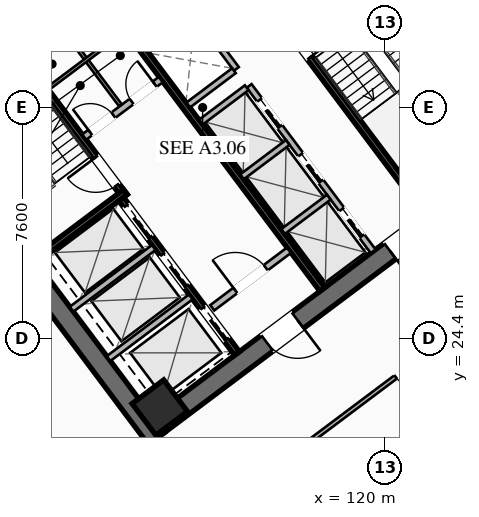
"""IFC4 building model, lengths in metres.
Left out: names, types, materials, properties, quantities, classifications, styles, units other than length and angle.
Written with IfcOpenShell. Run it as: python <this file> out.ifc"""

import sys

from ifc_helpers import new_model, si_unit, direction, frame, frame_2d, origin, origin_2d, place, context, subcontext, project, spatial, rectangle, hollow_rectangle, extrude, element, fill, save


model = new_model("IFC4")
c1 = context("Model", 3, precision=1e-05, world=origin(), true_north=direction((0.0, 1.0)))
c2 = subcontext(c1, "Body", "Model", "MODEL_VIEW")
j1 = project(units=[si_unit("LENGTHUNIT", "METRE"), si_unit("PLANEANGLEUNIT", "RADIAN")], contexts=[c1])
p1 = place(None, origin())
s1 = spatial("IfcSite", under=j1, at=p1, CompositionType="ELEMENT")
p2 = place(p1, origin())
s2 = spatial("IfcBuilding", under=s1, at=p2, CompositionType="ELEMENT")
p3 = place(p2, frame((0.0, 0.0, 60.1)))
s3 = spatial("IfcBuildingStorey", under=s2, at=p3, CompositionType="ELEMENT", Elevation=60.1)
for number, where, z_axis, x_axis in (
    (1, (112.476, 21.107, 0.0), (0.0, 0.0, 1.0), (-0.6, 0.8, 0.0)),
    (2, (115.524, 42.893, 0.0), (0.0, 0.0, 1.0), (0.6, -0.8, 0.0)),
):
    element("IfcWall", number, at=place(p3, frame(where, z_axis=z_axis, x_axis=x_axis)), inside=s3, PredefinedType="SHEAR", context=c2, shape_type="SweptSolid", body=[
        extrude(rectangle(XDim=15.6, YDim=0.65, at=frame_2d((7.8, 0.0))), origin(), (0.0, 0.0, 1.0), 3.55),
    ])
p4 = place(p3, frame((124.429, 30.478, 0.0), z_axis=(0.0, 0.0, 1.0), x_axis=(-0.799998028465, -0.600002628705, 0.0)))
e3 = element("IfcWall", 3, at=p4, inside=s3, PredefinedType="SHEAR", context=c2, shape_type="SweptSolid", body=[
    extrude(rectangle(XDim=14.86, YDim=0.65, at=frame_2d((7.43, 0.0))), origin(), (0.0, 0.0, 1.0), 3.55),
])
p5 = place(p4, frame((9.13, 0.0, 0.0)))
e4 = element("IfcOpeningElement", 4, at=p5, cuts=e3, PredefinedType="OPENING", context=c2, shape_type="SweptSolid", body=[
    extrude(rectangle(XDim=1.25, YDim=2.25, at=frame_2d((0.625, 1.125))), frame((0.0, 0.335, 0.0), z_axis=(0.0, -1.0, 0.0), x_axis=(1.0, 0.0, 0.0)), (0.0, 0.0, 1.0), 0.67),
])
p6 = place(p4, frame((4.08, 0.0, 0.0)))
e5 = element("IfcOpeningElement", 5, at=p6, cuts=e3, PredefinedType="OPENING", context=c2, shape_type="SweptSolid", body=[
    extrude(rectangle(XDim=1.25, YDim=2.25, at=frame_2d((0.625, 1.125))), frame((0.0, 0.335, 0.0), z_axis=(0.0, -1.0, 0.0), x_axis=(1.0, 0.0, 0.0)), (0.0, 0.0, 1.0), 0.67),
])
p7 = place(p3, frame((103.571, 33.522, 0.0), z_axis=(0.0, 0.0, 1.0), x_axis=(0.799998028465, 0.600002628705, 0.0)))
e6 = element("IfcWall", 6, at=p7, inside=s3, PredefinedType="SHEAR", context=c2, shape_type="SweptSolid", body=[
    extrude(rectangle(XDim=14.86, YDim=0.65, at=frame_2d((7.43, 0.0))), origin(), (0.0, 0.0, 1.0), 3.55),
])
p8 = place(p7, frame((4.48, 0.0, 0.0)))
e7 = element("IfcOpeningElement", 7, at=p8, cuts=e6, PredefinedType="OPENING", context=c2, shape_type="SweptSolid", body=[
    extrude(rectangle(XDim=1.25, YDim=2.25, at=frame_2d((0.625, 1.125))), frame((0.0, 0.335, 0.0), z_axis=(0.0, -1.0, 0.0), x_axis=(1.0, 0.0, 0.0)), (0.0, 0.0, 1.0), 0.67),
])
p9 = place(p7, frame((9.53, 0.0, 0.0)))
e8 = element("IfcOpeningElement", 8, at=p9, cuts=e6, PredefinedType="OPENING", context=c2, shape_type="SweptSolid", body=[
    extrude(rectangle(XDim=1.25, YDim=2.25, at=frame_2d((0.625, 1.125))), frame((0.0, 0.335, 0.0), z_axis=(0.0, -1.0, 0.0), x_axis=(1.0, 0.0, 0.0)), (0.0, 0.0, 1.0), 0.67),
])
p10 = place(p3, frame((112.59, 22.13, 0.0), z_axis=(0.0, 0.0, 1.0), x_axis=(0.799999996291, 0.600000004945, 0.0)))
e9 = element("IfcColumn", 9, at=p10, inside=s3, PredefinedType="COLUMN", context=c2, shape_type="SweptSolid", body=[
    extrude(hollow_rectangle(XDim=1.3, YDim=1.3, WallThickness=0.05, at=origin_2d()), origin(), (0.0, 0.0, 1.0), 3.35),
])
p11 = place(p3, frame((111.44, 29.08, 0.0), z_axis=(0.0, 0.0, 1.0), x_axis=(-0.600009827119, 0.799992629566, 0.0)))
e10 = element("IfcWall", 10, at=p11, inside=s3, PredefinedType="SHEAR", context=c2, shape_type="SweptSolid", body=[
    extrude(rectangle(XDim=7.95, YDim=0.2, at=frame_2d((3.975, 0.0))), origin(), (0.0, 0.0, 1.0), 3.35),
])
p12 = place(p11, frame((0.45, 0.0, 0.0)))
e11 = element("IfcOpeningElement", 11, at=p12, cuts=e10, PredefinedType="OPENING", context=c2, shape_type="SweptSolid", body=[
    extrude(rectangle(XDim=1.15, YDim=2.2, at=frame_2d((0.575, 1.1))), frame((0.0, 0.11, 0.0), z_axis=(0.0, -1.0, 0.0), x_axis=(1.0, 0.0, 0.0)), (0.0, 0.0, 1.0), 0.22),
])
p13 = place(p3, frame((108.476, 26.982, 0.0), z_axis=(0.0, 0.0, 1.0), x_axis=(0.799984290658, 0.600020945218, 0.0)))
e12 = element("IfcWall", 12, at=p13, inside=s3, PredefinedType="SHEAR", context=c2, shape_type="SweptSolid", body=[
    extrude(rectangle(XDim=3.73, YDim=0.2, at=frame_2d((1.865, 0.0))), origin(), (0.0, 0.0, 1.0), 3.35),
])
p14 = place(p3, frame((116.56, 34.92, 0.0), z_axis=(0.0, 0.0, 1.0), x_axis=(0.600009827119, -0.799992629566, 0.0)))
e13 = element("IfcWall", 13, at=p14, inside=s3, PredefinedType="SHEAR", context=c2, shape_type="SweptSolid", body=[
    extrude(rectangle(XDim=7.95, YDim=0.2, at=frame_2d((3.975, 0.0))), origin(), (0.0, 0.0, 1.0), 3.35),
])
p15 = place(p14, frame((0.45, 0.0, 0.0)))
e14 = element("IfcOpeningElement", 14, at=p15, cuts=e13, PredefinedType="OPENING", context=c2, shape_type="SweptSolid", body=[
    extrude(rectangle(XDim=1.15, YDim=2.2, at=frame_2d((0.575, 1.1))), frame((0.0, 0.11, 0.0), z_axis=(0.0, -1.0, 0.0), x_axis=(1.0, 0.0, 0.0)), (0.0, 0.0, 1.0), 0.22),
])
p16 = place(p3, frame((117.938, 26.016, 0.0), z_axis=(0.0, 0.0, 1.0), x_axis=(-0.600005463273, 0.799995902516, 0.0)))
e15 = element("IfcWall", 15, at=p16, inside=s3, PredefinedType="SHEAR", context=c2, shape_type="SweptSolid", body=[
    extrude(rectangle(XDim=14.3, YDim=0.2, at=frame_2d((7.15, 0.0))), origin(), (0.0, 0.0, 1.0), 3.35),
])
p17 = place(p3, frame((110.104, 31.028, 0.0), z_axis=(0.0, 0.0, 1.0), x_axis=(0.800018601094, 0.59997519774, 0.0)))
e16 = element("IfcWall", 16, at=p17, inside=s3, PredefinedType="SOLIDWALL", context=c2, shape_type="SweptSolid", body=[
    extrude(rectangle(XDim=3.15, YDim=0.22, at=frame_2d((1.575, 0.0))), origin(), (0.0, 0.0, 1.0), 2.703),
])
p18 = place(p17, frame((0.25, 0.0, 0.0)))
e17 = element("IfcOpeningElement", 17, at=p18, cuts=e16, PredefinedType="OPENING", context=c2, shape_type="SweptSolid", body=[
    extrude(rectangle(XDim=0.95, YDim=2.05, at=frame_2d((0.475, 1.025))), frame((0.0, 0.12, 0.0), z_axis=(0.0, -1.0, 0.0), x_axis=(1.0, 0.0, 0.0)), (0.0, 0.0, 1.0), 0.24),
])
p19 = place(p17, frame((1.95, 0.0, 0.0)))
e18 = element("IfcOpeningElement", 18, at=p19, cuts=e16, PredefinedType="OPENING", context=c2, shape_type="SweptSolid", body=[
    extrude(rectangle(XDim=0.95, YDim=2.05, at=frame_2d((0.475, 1.025))), frame((0.0, 0.12, 0.0), z_axis=(0.0, -1.0, 0.0), x_axis=(1.0, 0.0, 0.0)), (0.0, 0.0, 1.0), 0.24),
])
p20 = place(p3, frame((114.316, 25.412, 0.0), z_axis=(0.0, 0.0, 1.0), x_axis=(0.800018601094, 0.59997519774, 0.0)))
e19 = element("IfcWall", 19, at=p20, inside=s3, PredefinedType="SOLIDWALL", context=c2, shape_type="SweptSolid", body=[
    extrude(rectangle(XDim=3.15, YDim=0.22, at=frame_2d((1.575, 0.0))), origin(), (0.0, 0.0, 1.0), 2.703),
])
p21 = place(p20, frame((0.95, 0.0, 0.0)))
e20 = element("IfcOpeningElement", 20, at=p21, cuts=e19, PredefinedType="OPENING", context=c2, shape_type="SweptSolid", body=[
    extrude(rectangle(XDim=1.25, YDim=2.25, at=frame_2d((0.625, 1.125))), frame((0.0, 0.12, 0.0), z_axis=(0.0, -1.0, 0.0), x_axis=(1.0, 0.0, 0.0)), (0.0, 0.0, 1.0), 0.24),
])
p22 = place(p3, frame((115.13, 23.91, 0.0), z_axis=(0.0, 0.0, 1.0), x_axis=(-0.599975393228, 0.800018454488, 0.0)))
e21 = element("IfcWall", 21, at=p22, inside=s3, PredefinedType="SHEAR", context=c2, shape_type="SweptSolid", body=[
    extrude(rectangle(XDim=6.35, YDim=0.2, at=frame_2d((3.175, 0.0))), origin(), (0.0, 0.0, 1.0), 3.35),
])
p23 = place(p22, frame((4.775, 0.0, 0.0)))
e22 = element("IfcOpeningElement", 22, at=p23, cuts=e21, PredefinedType="OPENING", context=c2, shape_type="SweptSolid", body=[
    extrude(rectangle(XDim=1.3, YDim=2.25, at=frame_2d((0.65, 1.125))), frame((0.0, 0.11, 0.0), z_axis=(0.0, -1.0, 0.0), x_axis=(1.0, 0.0, 0.0)), (0.0, 0.0, 1.0), 0.22),
])
p24 = place(p22, frame((2.775, 0.0, 0.0)))
e23 = element("IfcOpeningElement", 23, at=p24, cuts=e21, PredefinedType="OPENING", context=c2, shape_type="SweptSolid", body=[
    extrude(rectangle(XDim=1.3, YDim=2.25, at=frame_2d((0.65, 1.125))), frame((0.0, 0.11, 0.0), z_axis=(0.0, -1.0, 0.0), x_axis=(1.0, 0.0, 0.0)), (0.0, 0.0, 1.0), 0.22),
])
p25 = place(p22, frame((0.575, 0.0, 0.0)))
e24 = element("IfcOpeningElement", 24, at=p25, cuts=e21, PredefinedType="OPENING", context=c2, shape_type="SweptSolid", body=[
    extrude(rectangle(XDim=1.3, YDim=2.25, at=frame_2d((0.65, 1.125))), frame((0.0, 0.11, 0.0), z_axis=(0.0, -1.0, 0.0), x_axis=(1.0, 0.0, 0.0)), (0.0, 0.0, 1.0), 0.22),
])
for number, where, z_axis, x_axis in (
    (25, (110.906, 23.742, 0.0), (0.0, 0.0, 1.0), (0.8, 0.6, 0.0)),
    (26, (109.688, 25.366, 0.0), (0.0, 0.0, 1.0), (0.8, 0.6, 0.0)),
):
    element("IfcWall", number, at=place(p3, frame(where, z_axis=z_axis, x_axis=x_axis)), inside=s3, PredefinedType="SOLIDWALL", context=c2, shape_type="SweptSolid", body=[
        extrude(rectangle(XDim=3.38, YDim=0.2, at=frame_2d((1.69, 0.0))), origin(), (0.0, 0.0, 1.0), 3.35),
    ])
p26 = place(p3, frame((111.296, 32.072, 0.0), z_axis=(0.0, 0.0, 1.0), x_axis=(-0.59995887973, 0.800030838552, 0.0)))
e27 = element("IfcWall", 27, at=p26, inside=s3, PredefinedType="PARTITIONING", context=c2, shape_type="SweptSolid", body=[
    extrude(rectangle(XDim=3.8, YDim=0.11, at=frame_2d((1.9, 0.0))), origin(), (0.0, 0.0, 1.0), 2.703),
])
p27 = place(p3, frame((108.91, 32.62, 0.0), z_axis=(0.0, 0.0, 1.0), x_axis=(0.800018601094, 0.59997519774, 0.0)))
e28 = element("IfcWall", 28, at=p27, inside=s3, PredefinedType="PARTITIONING", context=c2, shape_type="SweptSolid", body=[
    extrude(rectangle(XDim=3.15, YDim=0.11, at=frame_2d((1.575, 0.0))), origin(), (0.0, 0.0, 1.0), 2.703),
])
p28 = place(p3, frame((119.61, 27.27, 0.0), z_axis=(0.0, 0.0, 1.0), x_axis=(-0.600011488909, 0.79999138319, 0.0)))
e29 = element("IfcWall", 29, at=p28, inside=s3, PredefinedType="SOLIDWALL", context=c2, shape_type="SweptSolid", body=[
    extrude(rectangle(XDim=6.8, YDim=0.2, at=frame_2d((3.4, 0.0))), origin(), (0.0, 0.0, 1.0), 3.35),
])
p29 = place(p28, frame((0.625, 0.0, 0.0)))
e30 = element("IfcOpeningElement", 30, at=p29, cuts=e29, PredefinedType="OPENING", context=c2, shape_type="SweptSolid", body=[
    extrude(rectangle(XDim=1.1, YDim=2.2, at=frame_2d((0.55, 1.1))), frame((0.0, 0.11, 0.0), z_axis=(0.0, -1.0, 0.0), x_axis=(1.0, 0.0, 0.0)), (0.0, 0.0, 1.0), 0.22),
])
p30 = place(p28, frame((2.875, 0.0, 0.0)))
e31 = element("IfcOpeningElement", 31, at=p30, cuts=e29, PredefinedType="OPENING", context=c2, shape_type="SweptSolid", body=[
    extrude(rectangle(XDim=1.1, YDim=2.2, at=frame_2d((0.55, 1.1))), frame((0.0, 0.11, 0.0), z_axis=(0.0, -1.0, 0.0), x_axis=(1.0, 0.0, 0.0)), (0.0, 0.0, 1.0), 0.22),
])
p31 = place(p28, frame((5.125, 0.0, 0.0)))
e32 = element("IfcOpeningElement", 32, at=p31, cuts=e29, PredefinedType="OPENING", context=c2, shape_type="SweptSolid", body=[
    extrude(rectangle(XDim=1.1, YDim=2.2, at=frame_2d((0.55, 1.1))), frame((0.0, 0.11, 0.0), z_axis=(0.0, -1.0, 0.0), x_axis=(1.0, 0.0, 0.0)), (0.0, 0.0, 1.0), 0.22),
])
p32 = place(p3, frame((116.646, 27.922, 0.0), z_axis=(0.0, 0.0, 1.0), x_axis=(0.8, 0.6, 0.0)))
e33 = element("IfcWall", 33, at=p32, inside=s3, PredefinedType="SOLIDWALL", context=c2, shape_type="SweptSolid", body=[
    extrude(rectangle(XDim=1.88, YDim=0.2, at=frame_2d((0.94, 0.0))), origin(), (0.0, 0.0, 1.0), 3.35),
])
p33 = place(p3, frame((115.296, 29.722, 0.0), z_axis=(0.0, 0.0, 1.0), x_axis=(0.799984418148, 0.600020775241, 0.0)))
e34 = element("IfcWall", 34, at=p33, inside=s3, PredefinedType="SOLIDWALL", context=c2, shape_type="SweptSolid", body=[
    extrude(rectangle(XDim=1.88, YDim=0.2, at=frame_2d((0.94, 0.0))), origin(), (0.0, 0.0, 1.0), 3.35),
])
p34 = place(p3, frame((113.946, 31.522, 0.0), z_axis=(0.0, 0.0, 1.0), x_axis=(0.8, 0.6, 0.0)))
e35 = element("IfcWall", 35, at=p34, inside=s3, PredefinedType="SOLIDWALL", context=c2, shape_type="SweptSolid", body=[
    extrude(rectangle(XDim=1.88, YDim=0.2, at=frame_2d((0.94, 0.0))), origin(), (0.0, 0.0, 1.0), 3.35),
])
p35 = place(p3, frame((115.11, 33.27, 0.0), z_axis=(0.0, 0.0, 1.0), x_axis=(-0.600011488909, 0.79999138319, 0.0)))
e36 = element("IfcWall", 36, at=p35, inside=s3, PredefinedType="SOLIDWALL", context=c2, shape_type="SweptSolid", body=[
    extrude(rectangle(XDim=6.8, YDim=0.2, at=frame_2d((3.4, 0.0))), origin(), (0.0, 0.0, 1.0), 3.35),
])
p36 = place(p3, frame((113.526, 32.082, 0.0), z_axis=(0.0, 0.0, 1.0), x_axis=(0.800046745961, 0.599937666993, 0.0)))
e37 = element("IfcWall", 37, at=p36, inside=s3, PredefinedType="SOLIDWALL", context=c2, shape_type="SweptSolid", body=[
    extrude(rectangle(XDim=1.88, YDim=0.2, at=frame_2d((0.94, 0.0))), origin(), (0.0, 0.0, 1.0), 3.35),
])
p37 = place(p3, frame((112.176, 33.882, 0.0), z_axis=(0.0, 0.0, 1.0), x_axis=(0.8, 0.6, 0.0)))
e38 = element("IfcWall", 38, at=p37, inside=s3, PredefinedType="SOLIDWALL", context=c2, shape_type="SweptSolid", body=[
    extrude(rectangle(XDim=1.88, YDim=0.2, at=frame_2d((0.94, 0.0))), origin(), (0.0, 0.0, 1.0), 3.35),
])
p38 = place(p3, frame((135.46, 34.47, 0.0), z_axis=(0.0, 0.0, 1.0), x_axis=(-0.799998045563, -0.600002605907, 0.0)))
e39 = element("IfcWall", 39, at=p38, inside=s3, PredefinedType="PARTITIONING", context=c2, shape_type="SweptSolid", body=[
    extrude(rectangle(XDim=29.98, YDim=0.135, at=frame_2d((14.99, 0.0))), origin(), (0.0, 0.0, 1.0), 2.703),
])
p39 = place(p38, frame((28.65, 0.0, 0.0)))
e40 = element("IfcOpeningElement", 40, at=p39, cuts=e39, PredefinedType="OPENING", context=c2, shape_type="SweptSolid", body=[
    extrude(rectangle(XDim=0.95, YDim=2.05, at=frame_2d((0.475, 1.025))), frame((0.0, 0.077, 0.0), z_axis=(0.0, -1.0, 0.0), x_axis=(1.0, 0.0, 0.0)), (0.0, 0.0, 1.0), 0.155),
])
p40 = place(p38, frame((17.938, 0.0, 0.0)))
e41 = element("IfcOpeningElement", 41, at=p40, cuts=e39, PredefinedType="OPENING", context=c2, shape_type="SweptSolid", body=[
    extrude(rectangle(XDim=0.95, YDim=2.05, at=frame_2d((0.475, 1.025))), frame((0.0, 0.077, 0.0), z_axis=(0.0, -1.0, 0.0), x_axis=(1.0, 0.0, 0.0)), (0.0, 0.0, 1.0), 0.155),
])
p41 = place(p38, frame((0.38, 0.0, 0.0)))
e42 = element("IfcOpeningElement", 42, at=p41, cuts=e39, PredefinedType="OPENING", context=c2, shape_type="SweptSolid", body=[
    extrude(rectangle(XDim=0.95, YDim=2.05, at=frame_2d((0.475, 1.025))), frame((0.0, 0.077, 0.0), z_axis=(0.0, -1.0, 0.0), x_axis=(1.0, 0.0, 0.0)), (0.0, 0.0, 1.0), 0.155),
])
p42 = place(p3, frame((111.428, 16.546, 0.0), z_axis=(0.0, 0.0, 1.0), x_axis=(-0.599996389772, 0.800002707659, 0.0)))
e43 = element("IfcWall", 43, at=p42, inside=s3, PredefinedType="PARTITIONING", context=c2, shape_type="SweptSolid", body=[
    extrude(rectangle(XDim=21.64, YDim=0.135, at=frame_2d((10.82, 0.0))), origin(), (0.0, 0.0, 1.0), 2.703),
])
p43 = place(p42, frame((0.3, 0.0, 0.0)))
e44 = element("IfcOpeningElement", 44, at=p43, cuts=e43, PredefinedType="OPENING", context=c2, shape_type="SweptSolid", body=[
    extrude(rectangle(XDim=0.95, YDim=2.05, at=frame_2d((0.475, 1.025))), frame((0.0, 0.077, 0.0), z_axis=(0.0, -1.0, 0.0), x_axis=(1.0, 0.0, 0.0)), (0.0, 0.0, 1.0), 0.155),
])
p44 = place(p5, origin())
e45 = element("IfcDoor", 45, at=p44, inside=s3, OperationType="SINGLE_SWING_LEFT", PredefinedType="DOOR", context=c2, shape_type="SweptSolid", body=[
    extrude(rectangle(XDim=1.25, YDim=2.25, at=frame_2d((0.625, 1.125))), frame((0.0, 0.025, 0.0), z_axis=(0.0, -1.0, 0.0), x_axis=(1.0, 0.0, 0.0)), (0.0, 0.0, 1.0), 0.05),
])
fill(e4, e45)
p45 = place(p6, origin())
e46 = element("IfcDoor", 46, at=p45, inside=s3, OperationType="SINGLE_SWING_RIGHT", PredefinedType="DOOR", context=c2, shape_type="SweptSolid", body=[
    extrude(rectangle(XDim=1.25, YDim=2.25, at=frame_2d((0.625, 1.125))), frame((0.0, 0.025, 0.0), z_axis=(0.0, -1.0, 0.0), x_axis=(1.0, 0.0, 0.0)), (0.0, 0.0, 1.0), 0.05),
])
fill(e5, e46)
p46 = place(p12, origin())
e47 = element("IfcDoor", 47, at=p46, inside=s3, OperationType="SINGLE_SWING_RIGHT", PredefinedType="DOOR", context=c2, shape_type="SweptSolid", body=[
    extrude(rectangle(XDim=1.15, YDim=2.2, at=frame_2d((0.575, 1.1))), frame((0.0, 0.025, 0.0), z_axis=(0.0, -1.0, 0.0), x_axis=(1.0, 0.0, 0.0)), (0.0, 0.0, 1.0), 0.05),
])
fill(e11, e47)
p47 = place(p15, origin())
e48 = element("IfcDoor", 48, at=p47, inside=s3, OperationType="SINGLE_SWING_RIGHT", PredefinedType="DOOR", context=c2, shape_type="SweptSolid", body=[
    extrude(rectangle(XDim=1.15, YDim=2.2, at=frame_2d((0.575, 1.1))), frame((0.0, 0.025, 0.0), z_axis=(0.0, -1.0, 0.0), x_axis=(1.0, 0.0, 0.0)), (0.0, 0.0, 1.0), 0.05),
])
fill(e14, e48)
p48 = place(p21, origin())
e49 = element("IfcDoor", 49, at=p48, inside=s3, OperationType="SINGLE_SWING_LEFT", PredefinedType="DOOR", context=c2, shape_type="SweptSolid", body=[
    extrude(rectangle(XDim=1.25, YDim=2.25, at=frame_2d((0.625, 1.125))), frame((0.0, 0.025, 0.0), z_axis=(0.0, -1.0, 0.0), x_axis=(1.0, 0.0, 0.0)), (0.0, 0.0, 1.0), 0.05),
])
fill(e20, e49)
p49 = place(p18, origin())
e50 = element("IfcDoor", 50, at=p49, inside=s3, OperationType="SINGLE_SWING_LEFT", PredefinedType="DOOR", context=c2, shape_type="SweptSolid", body=[
    extrude(rectangle(XDim=0.95, YDim=2.05, at=frame_2d((0.475, 1.025))), frame((0.0, 0.025, 0.0), z_axis=(0.0, -1.0, 0.0), x_axis=(1.0, 0.0, 0.0)), (0.0, 0.0, 1.0), 0.05),
])
fill(e17, e50)
p50 = place(p19, origin())
e51 = element("IfcDoor", 51, at=p50, inside=s3, OperationType="SINGLE_SWING_RIGHT", PredefinedType="DOOR", context=c2, shape_type="SweptSolid", body=[
    extrude(rectangle(XDim=0.95, YDim=2.05, at=frame_2d((0.475, 1.025))), frame((0.0, 0.025, 0.0), z_axis=(0.0, -1.0, 0.0), x_axis=(1.0, 0.0, 0.0)), (0.0, 0.0, 1.0), 0.05),
])
fill(e18, e51)
p51 = place(p40, origin())
e52 = element("IfcDoor", 52, at=p51, inside=s3, OperationType="SINGLE_SWING_LEFT", PredefinedType="DOOR", context=c2, shape_type="SweptSolid", body=[
    extrude(rectangle(XDim=0.95, YDim=2.05, at=frame_2d((0.475, 1.025))), frame((0.0, 0.025, 0.0), z_axis=(0.0, -1.0, 0.0), x_axis=(1.0, 0.0, 0.0)), (0.0, 0.0, 1.0), 0.05),
])
fill(e41, e52)
p52 = place(p23, origin())
e53 = element("IfcDoor", 53, at=p52, inside=s3, OperationType="SLIDING_TO_LEFT", PredefinedType="DOOR", context=c2, shape_type="SweptSolid", body=[
    extrude(rectangle(XDim=1.3, YDim=2.25, at=frame_2d((0.65, 1.125))), frame((0.0, 0.025, 0.0), z_axis=(0.0, -1.0, 0.0), x_axis=(1.0, 0.0, 0.0)), (0.0, 0.0, 1.0), 0.05),
])
fill(e22, e53)
p53 = place(p24, origin())
e54 = element("IfcDoor", 54, at=p53, inside=s3, OperationType="SLIDING_TO_LEFT", PredefinedType="DOOR", context=c2, shape_type="SweptSolid", body=[
    extrude(rectangle(XDim=1.3, YDim=2.25, at=frame_2d((0.65, 1.125))), frame((0.0, 0.025, 0.0), z_axis=(0.0, -1.0, 0.0), x_axis=(1.0, 0.0, 0.0)), (0.0, 0.0, 1.0), 0.05),
])
fill(e23, e54)
p54 = place(p25, origin())
e55 = element("IfcDoor", 55, at=p54, inside=s3, OperationType="SLIDING_TO_LEFT", PredefinedType="DOOR", context=c2, shape_type="SweptSolid", body=[
    extrude(rectangle(XDim=1.3, YDim=2.25, at=frame_2d((0.65, 1.125))), frame((0.0, 0.025, 0.0), z_axis=(0.0, -1.0, 0.0), x_axis=(1.0, 0.0, 0.0)), (0.0, 0.0, 1.0), 0.05),
])
fill(e24, e55)
p55 = place(p29, origin())
e56 = element("IfcDoor", 56, at=p55, inside=s3, OperationType="SLIDING_TO_LEFT", PredefinedType="DOOR", context=c2, shape_type="SweptSolid", body=[
    extrude(rectangle(XDim=1.1, YDim=2.2, at=frame_2d((0.55, 1.1))), frame((0.0, 0.025, 0.0), z_axis=(0.0, -1.0, 0.0), x_axis=(1.0, 0.0, 0.0)), (0.0, 0.0, 1.0), 0.05),
])
fill(e30, e56)
p56 = place(p30, origin())
e57 = element("IfcDoor", 57, at=p56, inside=s3, OperationType="SLIDING_TO_LEFT", PredefinedType="DOOR", context=c2, shape_type="SweptSolid", body=[
    extrude(rectangle(XDim=1.1, YDim=2.2, at=frame_2d((0.55, 1.1))), frame((0.0, 0.025, 0.0), z_axis=(0.0, -1.0, 0.0), x_axis=(1.0, 0.0, 0.0)), (0.0, 0.0, 1.0), 0.05),
])
fill(e31, e57)
p57 = place(p31, origin())
e58 = element("IfcDoor", 58, at=p57, inside=s3, OperationType="SLIDING_TO_LEFT", PredefinedType="DOOR", context=c2, shape_type="SweptSolid", body=[
    extrude(rectangle(XDim=1.1, YDim=2.2, at=frame_2d((0.55, 1.1))), frame((0.0, 0.025, 0.0), z_axis=(0.0, -1.0, 0.0), x_axis=(1.0, 0.0, 0.0)), (0.0, 0.0, 1.0), 0.05),
])
fill(e32, e58)
save(model, sys.argv[1])
